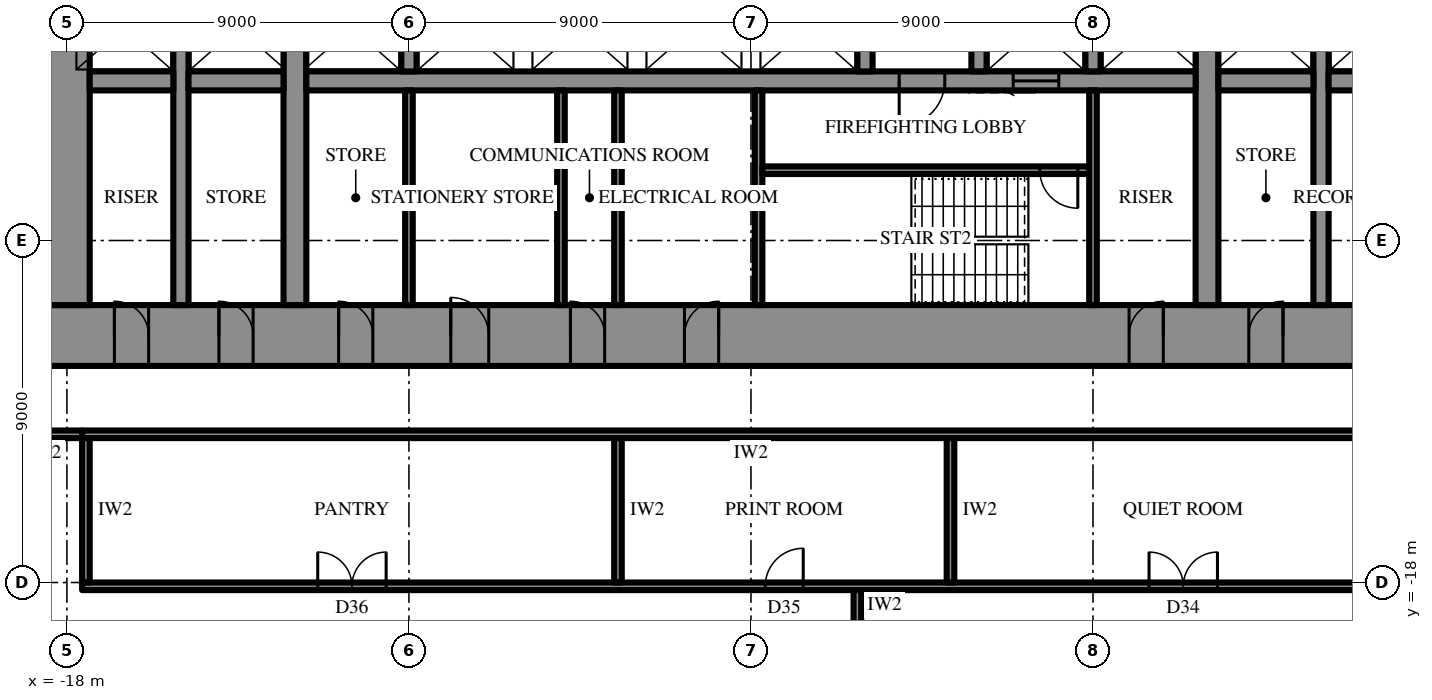
"""IFC4 building model, lengths in metres.
Left out: names, types, materials, properties, quantities, classifications, styles, units other than length and angle.
Written with IfcOpenShell. Run it as: python <this file> out.ifc"""

import sys

from ifc_helpers import new_model, si_unit, direction, frame, frame_2d, origin, place, context, subcontext, project, spatial, rectangle, extrude, element, fill, save


model = new_model("IFC4")
c1 = context("Model", 3, precision=1e-05, world=origin(), true_north=direction((0.0, 1.0)))
c2 = subcontext(c1, "Body", "Model", "MODEL_VIEW")
j1 = project(units=[si_unit("LENGTHUNIT", "METRE"), si_unit("PLANEANGLEUNIT", "RADIAN")], contexts=[c1])
p1 = place(None, origin())
s1 = spatial("IfcSite", under=j1, at=p1, CompositionType="ELEMENT")
p2 = place(p1, origin())
s2 = spatial("IfcBuilding", under=s1, at=p2, CompositionType="ELEMENT")
p3 = place(p2, frame((0.0, 0.0, 36.1)))
s3 = spatial("IfcBuildingStorey", under=s2, at=p3, CompositionType="ELEMENT", Elevation=36.1)
p4 = place(p3, frame((18.6, -11.5, 0.0), z_axis=(0.0, 0.0, 1.0), x_axis=(-1.0, 0.0, 0.0)))
e1 = element("IfcWall", 1, at=p4, inside=s3, PredefinedType="SHEAR", context=c2, shape_type="SweptSolid", body=[
    extrude(rectangle(XDim=37.2, YDim=1.6, at=frame_2d((18.6, 0.0))), origin(), (0.0, 0.0, 1.0), 4.2),
])
p5 = place(p4, frame((19.45, 0.0, 0.0)))
e2 = element("IfcOpeningElement", 2, at=p5, cuts=e1, PredefinedType="OPENING", context=c2, shape_type="SweptSolid", body=[
    extrude(rectangle(XDim=0.9, YDim=2.2, at=frame_2d((0.45, 1.1))), frame((0.0, 0.81, 0.0), z_axis=(0.0, -1.0, 0.0), x_axis=(1.0, 0.0, 0.0)), (0.0, 0.0, 1.0), 1.62),
])
p6 = place(p4, frame((22.45, 0.0, 0.0)))
e3 = element("IfcOpeningElement", 3, at=p6, cuts=e1, PredefinedType="OPENING", context=c2, shape_type="SweptSolid", body=[
    extrude(rectangle(XDim=0.9, YDim=2.2, at=frame_2d((0.45, 1.1))), frame((0.0, 0.81, 0.0), z_axis=(0.0, -1.0, 0.0), x_axis=(1.0, 0.0, 0.0)), (0.0, 0.0, 1.0), 1.62),
])
p7 = place(p4, frame((25.5, 0.0, 0.0)))
e4 = element("IfcOpeningElement", 4, at=p7, cuts=e1, PredefinedType="OPENING", context=c2, shape_type="SweptSolid", body=[
    extrude(rectangle(XDim=1.0, YDim=2.2, at=frame_2d((0.5, 1.1))), frame((0.0, 0.81, 0.0), z_axis=(0.0, -1.0, 0.0), x_axis=(1.0, 0.0, 0.0)), (0.0, 0.0, 1.0), 1.62),
])
p8 = place(p4, frame((1.85, 0.0, 0.0)))
e5 = element("IfcOpeningElement", 5, at=p8, cuts=e1, PredefinedType="OPENING", context=c2, shape_type="SweptSolid", body=[
    extrude(rectangle(XDim=0.9, YDim=2.2, at=frame_2d((0.45, 1.1))), frame((0.0, 0.81, 0.0), z_axis=(0.0, -1.0, 0.0), x_axis=(1.0, 0.0, 0.0)), (0.0, 0.0, 1.0), 1.62),
])
p9 = place(p4, frame((4.6, 0.0, 0.0)))
e6 = element("IfcOpeningElement", 6, at=p9, cuts=e1, PredefinedType="OPENING", context=c2, shape_type="SweptSolid", body=[
    extrude(rectangle(XDim=0.9, YDim=2.2, at=frame_2d((0.45, 1.1))), frame((0.0, 0.81, 0.0), z_axis=(0.0, -1.0, 0.0), x_axis=(1.0, 0.0, 0.0)), (0.0, 0.0, 1.0), 1.62),
])
p10 = place(p4, frame((7.75, 0.0, 0.0)))
e7 = element("IfcOpeningElement", 7, at=p10, cuts=e1, PredefinedType="OPENING", context=c2, shape_type="SweptSolid", body=[
    extrude(rectangle(XDim=0.9, YDim=2.2, at=frame_2d((0.45, 1.1))), frame((0.0, 0.81, 0.0), z_axis=(0.0, -1.0, 0.0), x_axis=(1.0, 0.0, 0.0)), (0.0, 0.0, 1.0), 1.62),
])
p11 = place(p4, frame((28.55, 0.0, 0.0)))
e8 = element("IfcOpeningElement", 8, at=p11, cuts=e1, PredefinedType="OPENING", context=c2, shape_type="SweptSolid", body=[
    extrude(rectangle(XDim=0.9, YDim=2.2, at=frame_2d((0.45, 1.1))), frame((0.0, 0.81, 0.0), z_axis=(0.0, -1.0, 0.0), x_axis=(1.0, 0.0, 0.0)), (0.0, 0.0, 1.0), 1.62),
])
p12 = place(p4, frame((31.7, 0.0, 0.0)))
e9 = element("IfcOpeningElement", 9, at=p12, cuts=e1, PredefinedType="OPENING", context=c2, shape_type="SweptSolid", body=[
    extrude(rectangle(XDim=0.9, YDim=2.2, at=frame_2d((0.45, 1.1))), frame((0.0, 0.81, 0.0), z_axis=(0.0, -1.0, 0.0), x_axis=(1.0, 0.0, 0.0)), (0.0, 0.0, 1.0), 1.62),
])
p13 = place(p4, frame((34.45, 0.0, 0.0)))
e10 = element("IfcOpeningElement", 10, at=p13, cuts=e1, PredefinedType="OPENING", context=c2, shape_type="SweptSolid", body=[
    extrude(rectangle(XDim=0.9, YDim=2.2, at=frame_2d((0.45, 1.1))), frame((0.0, 0.81, 0.0), z_axis=(0.0, -1.0, 0.0), x_axis=(1.0, 0.0, 0.0)), (0.0, 0.0, 1.0), 1.62),
])
p14 = place(p3, frame((-18.0, 10.7, 0.0), z_axis=(0.0, 0.0, 1.0), x_axis=(0.0, -1.0, 0.0)))
e11 = element("IfcWall", 11, at=p14, inside=s3, PredefinedType="SHEAR", context=c2, shape_type="SweptSolid", body=[
    extrude(rectangle(XDim=21.4, YDim=1.2, at=frame_2d((10.7, 0.0))), origin(), (0.0, 0.0, 1.0), 4.2),
])
p15 = place(p14, frame((9.8, 0.0, 0.0)))
e12 = element("IfcOpeningElement", 12, at=p15, cuts=e11, PredefinedType="OPENING", context=c2, shape_type="SweptSolid", body=[
    extrude(rectangle(XDim=1.8, YDim=2.4, at=frame_2d((0.9, 1.2))), frame((0.0, 0.61, 0.0), z_axis=(0.0, -1.0, 0.0), x_axis=(1.0, 0.0, 0.0)), (0.0, 0.0, 1.0), 1.22),
])
p16 = place(p3, frame((12.0, -10.7, 0.0), z_axis=(0.0, 0.0, 1.0), x_axis=(0.0, 1.0, 0.0)))
e13 = element("IfcWall", 13, at=p16, inside=s3, PredefinedType="SHEAR", context=c2, shape_type="SweptSolid", body=[
    extrude(rectangle(XDim=21.4, YDim=0.6, at=frame_2d((10.7, 0.0))), origin(), (0.0, 0.0, 1.0), 4.2),
])
p17 = place(p16, frame((9.8, 0.0, 0.0)))
e14 = element("IfcOpeningElement", 14, at=p17, cuts=e13, PredefinedType="OPENING", context=c2, shape_type="SweptSolid", body=[
    extrude(rectangle(XDim=1.8, YDim=2.4, at=frame_2d((0.9, 1.2))), frame((0.0, 0.31, 0.0), z_axis=(0.0, -1.0, 0.0), x_axis=(1.0, 0.0, 0.0)), (0.0, 0.0, 1.0), 0.62),
])
p18 = place(p3, frame((-12.0, -10.7, 0.0), z_axis=(0.0, 0.0, 1.0), x_axis=(0.0, 1.0, 0.0)))
e15 = element("IfcWall", 15, at=p18, inside=s3, PredefinedType="SHEAR", context=c2, shape_type="SweptSolid", body=[
    extrude(rectangle(XDim=21.4, YDim=0.6, at=frame_2d((10.7, 0.0))), origin(), (0.0, 0.0, 1.0), 4.2),
])
p19 = place(p18, frame((9.8, 0.0, 0.0)))
e16 = element("IfcOpeningElement", 16, at=p19, cuts=e15, PredefinedType="OPENING", context=c2, shape_type="SweptSolid", body=[
    extrude(rectangle(XDim=1.8, YDim=2.4, at=frame_2d((0.9, 1.2))), frame((0.0, 0.31, 0.0), z_axis=(0.0, -1.0, 0.0), x_axis=(1.0, 0.0, 0.0)), (0.0, 0.0, 1.0), 0.62),
])
p20 = place(p3, frame((15.0, -10.7, 0.0), z_axis=(0.0, 0.0, 1.0), x_axis=(0.0, 1.0, 0.0)))
e17 = element("IfcWall", 17, at=p20, inside=s3, PredefinedType="SHEAR", context=c2, shape_type="SweptSolid", body=[
    extrude(rectangle(XDim=21.4, YDim=0.4, at=frame_2d((10.7, 0.0))), origin(), (0.0, 0.0, 1.0), 4.2),
])
p21 = place(p20, frame((9.8, 0.0, 0.0)))
e18 = element("IfcOpeningElement", 18, at=p21, cuts=e17, PredefinedType="OPENING", context=c2, shape_type="SweptSolid", body=[
    extrude(rectangle(XDim=1.8, YDim=2.4, at=frame_2d((0.9, 1.2))), frame((0.0, 0.21, 0.0), z_axis=(0.0, -1.0, 0.0), x_axis=(1.0, 0.0, 0.0)), (0.0, 0.0, 1.0), 0.42),
])
p22 = place(p3, frame((-15.0, -10.7, 0.0), z_axis=(0.0, 0.0, 1.0), x_axis=(0.0, 1.0, 0.0)))
e19 = element("IfcWall", 19, at=p22, inside=s3, PredefinedType="SHEAR", context=c2, shape_type="SweptSolid", body=[
    extrude(rectangle(XDim=21.4, YDim=0.4, at=frame_2d((10.7, 0.0))), origin(), (0.0, 0.0, 1.0), 4.2),
])
p23 = place(p22, frame((9.8, 0.0, 0.0)))
e20 = element("IfcOpeningElement", 20, at=p23, cuts=e19, PredefinedType="OPENING", context=c2, shape_type="SweptSolid", body=[
    extrude(rectangle(XDim=1.8, YDim=2.4, at=frame_2d((0.9, 1.2))), frame((0.0, 0.21, 0.0), z_axis=(0.0, -1.0, 0.0), x_axis=(1.0, 0.0, 0.0)), (0.0, 0.0, 1.0), 0.42),
])
p24 = place(p3, frame((17.4, -4.8, 0.0), z_axis=(0.0, 0.0, 1.0), x_axis=(-1.0, 0.0, 0.0)))
e21 = element("IfcWall", 21, at=p24, inside=s3, PredefinedType="SHEAR", context=c2, shape_type="SweptSolid", body=[
    extrude(rectangle(XDim=2.2, YDim=0.5, at=frame_2d((1.1, 0.0))), origin(), (0.0, 0.0, 1.0), 4.2),
])
p25 = place(p3, frame((14.8, -4.8, 0.0), z_axis=(0.0, 0.0, 1.0), x_axis=(-1.0, 0.0, 0.0)))
e22 = element("IfcWall", 22, at=p25, inside=s3, PredefinedType="SHEAR", context=c2, shape_type="SweptSolid", body=[
    extrude(rectangle(XDim=2.5, YDim=0.5, at=frame_2d((1.25, 0.0))), origin(), (0.0, 0.0, 1.0), 4.2),
])
p26 = place(p3, frame((11.7, -4.8, 0.0), z_axis=(0.0, 0.0, 1.0), x_axis=(-1.0, 0.0, 0.0)))
e23 = element("IfcWall", 23, at=p26, inside=s3, PredefinedType="SHEAR", context=c2, shape_type="SweptSolid", body=[
    extrude(rectangle(XDim=23.4, YDim=0.5, at=frame_2d((11.7, 0.0))), origin(), (0.0, 0.0, 1.0), 4.2),
])
p27 = place(p26, frame((6.6, 0.0, 0.0)))
e24 = element("IfcOpeningElement", 24, at=p27, cuts=e23, PredefinedType="OPENING", context=c2, shape_type="SweptSolid", body=[
    extrude(rectangle(XDim=1.2, YDim=2.2, at=frame_2d((0.6, 1.1))), frame((0.0, 0.26, 0.0), z_axis=(0.0, -1.0, 0.0), x_axis=(1.0, 0.0, 0.0)), (0.0, 0.0, 1.0), 0.52),
])
p28 = place(p26, frame((3.6, 0.0, 0.0)))
e25 = element("IfcOpeningElement", 25, at=p28, cuts=e23, PredefinedType="OPENING", context=c2, shape_type="SweptSolid", body=[
    extrude(rectangle(XDim=1.2, YDim=2.2, at=frame_2d((0.6, 1.1))), frame((0.0, 0.26, 0.0), z_axis=(0.0, -1.0, 0.0), x_axis=(1.0, 0.0, 0.0)), (0.0, 0.0, 1.0), 0.52),
])
p29 = place(p3, frame((-12.3, -4.8, 0.0), z_axis=(0.0, 0.0, 1.0), x_axis=(-1.0, 0.0, 0.0)))
e26 = element("IfcWall", 26, at=p29, inside=s3, PredefinedType="SHEAR", context=c2, shape_type="SweptSolid", body=[
    extrude(rectangle(XDim=2.5, YDim=0.5, at=frame_2d((1.25, 0.0))), origin(), (0.0, 0.0, 1.0), 4.2),
])
p30 = place(p3, frame((-15.2, -4.8, 0.0), z_axis=(0.0, 0.0, 1.0), x_axis=(-1.0, 0.0, 0.0)))
e27 = element("IfcWall", 27, at=p30, inside=s3, PredefinedType="SHEAR", context=c2, shape_type="SweptSolid", body=[
    extrude(rectangle(XDim=2.2, YDim=0.5, at=frame_2d((1.1, 0.0))), origin(), (0.0, 0.0, 1.0), 4.2),
])
for number, where, z_axis, x_axis in (
    (28, (9.0, -2.25, 0.0), (0.0, 0.0, 1.0), (0.0, -1.0, 0.0)),
    (29, (6.0, -2.25, 0.0), (0.0, 0.0, 1.0), (0.0, -1.0, 0.0)),
    (30, (3.0, -2.25, 0.0), (0.0, 0.0, 1.0), (0.0, -1.0, 0.0)),
    (31, (-9.0, -2.25, 0.0), (0.0, 0.0, 1.0), (0.0, -1.0, 0.0)),
):
    element("IfcWall", number, at=place(p3, frame(where, z_axis=z_axis, x_axis=x_axis)), inside=s3, PredefinedType="SHEAR", context=c2, shape_type="SweptSolid", body=[
        extrude(rectangle(XDim=2.3, YDim=0.4, at=frame_2d((1.15, 0.0))), origin(), (0.0, 0.0, 1.0), 4.2),
    ])
p31 = place(p3, frame((0.2, -5.05, 0.0), z_axis=(0.0, 0.0, 1.0), x_axis=(0.0, -1.0, 0.0)))
e32 = element("IfcWall", 32, at=p31, inside=s3, PredefinedType="SHEAR", context=c2, shape_type="SweptSolid", body=[
    extrude(rectangle(XDim=5.65, YDim=0.2, at=frame_2d((2.825, 0.0))), origin(), (0.0, 0.0, 1.0), 4.2),
])
p32 = place(p3, frame((8.9, -7.15, 0.0), z_axis=(0.0, 0.0, 1.0), x_axis=(-1.0, 0.0, 0.0)))
e33 = element("IfcWall", 33, at=p32, inside=s3, PredefinedType="SHEAR", context=c2, shape_type="SweptSolid", body=[
    extrude(rectangle(XDim=8.6, YDim=0.2, at=frame_2d((4.3, 0.0))), origin(), (0.0, 0.0, 1.0), 4.2),
])
p33 = place(p32, frame((0.3, 0.0, 0.0)))
e34 = element("IfcOpeningElement", 34, at=p33, cuts=e33, PredefinedType="OPENING", context=c2, shape_type="SweptSolid", body=[
    extrude(rectangle(XDim=1.0, YDim=2.2, at=frame_2d((0.5, 1.1))), frame((0.0, 0.11, 0.0), z_axis=(0.0, -1.0, 0.0), x_axis=(1.0, 0.0, 0.0)), (0.0, 0.0, 1.0), 0.22),
])
for number, where, z_axis, x_axis in (
    (35, (9.0, -5.05, 0.0), (0.0, 0.0, 1.0), (0.0, -1.0, 0.0)),
    (36, (-9.0, -5.05, 0.0), (0.0, 0.0, 1.0), (0.0, -1.0, 0.0)),
    (37, (-3.5, -5.05, 0.0), (0.0, 0.0, 1.0), (0.0, -1.0, 0.0)),
    (38, (-5.0, -5.05, 0.0), (0.0, 0.0, 1.0), (0.0, -1.0, 0.0)),
):
    element("IfcWall", number, at=place(p3, frame(where, z_axis=z_axis, x_axis=x_axis)), inside=s3, PredefinedType="PARTITIONING", context=c2, shape_type="SweptSolid", body=[
        extrude(rectangle(XDim=5.65, YDim=0.2, at=frame_2d((2.825, 0.0))), origin(), (0.0, 0.0, 1.0), 4.0),
    ])
p34 = place(p3, frame((17.6, -14.1, 0.0), z_axis=(0.0, 0.0, 1.0), x_axis=(-1.0, 0.0, 0.0)))
e39 = element("IfcWall", 39, at=p34, inside=s3, PredefinedType="PARTITIONING", context=c2, shape_type="SweptSolid", body=[
    extrude(rectangle(XDim=35.2, YDim=0.2, at=frame_2d((17.6, 0.0))), origin(), (0.0, 0.0, 1.0), 4.0),
])
p35 = place(p3, frame((17.6, -18.1, 0.0), z_axis=(0.0, 0.0, 1.0), x_axis=(-1.0, 0.0, 0.0)))
e40 = element("IfcWall", 40, at=p35, inside=s3, PredefinedType="PARTITIONING", context=c2, shape_type="SweptSolid", body=[
    extrude(rectangle(XDim=35.2, YDim=0.2, at=frame_2d((17.6, 0.0))), origin(), (0.0, 0.0, 1.0), 4.0),
])
p36 = place(p35, frame((5.325, 0.0, 0.0)))
e41 = element("IfcOpeningElement", 41, at=p36, cuts=e40, PredefinedType="OPENING", context=c2, shape_type="SweptSolid", body=[
    extrude(rectangle(XDim=1.8, YDim=2.4, at=frame_2d((0.9, 1.2))), frame((0.0, 0.11, 0.0), z_axis=(0.0, -1.0, 0.0), x_axis=(1.0, 0.0, 0.0)), (0.0, 0.0, 1.0), 0.22),
])
p37 = place(p35, frame((16.225, 0.0, 0.0)))
e42 = element("IfcOpeningElement", 42, at=p37, cuts=e40, PredefinedType="OPENING", context=c2, shape_type="SweptSolid", body=[
    extrude(rectangle(XDim=1.0, YDim=2.2, at=frame_2d((0.5, 1.1))), frame((0.0, 0.11, 0.0), z_axis=(0.0, -1.0, 0.0), x_axis=(1.0, 0.0, 0.0)), (0.0, 0.0, 1.0), 0.22),
])
p38 = place(p35, frame((27.2, 0.0, 0.0)))
e43 = element("IfcOpeningElement", 43, at=p38, cuts=e40, PredefinedType="OPENING", context=c2, shape_type="SweptSolid", body=[
    extrude(rectangle(XDim=1.8, YDim=2.4, at=frame_2d((0.9, 1.2))), frame((0.0, 0.11, 0.0), z_axis=(0.0, -1.0, 0.0), x_axis=(1.0, 0.0, 0.0)), (0.0, 0.0, 1.0), 0.22),
])
p39 = place(p3, frame((5.25, -14.2, 0.0), z_axis=(0.0, 0.0, 1.0), x_axis=(0.0, -1.0, 0.0)))
e44 = element("IfcWall", 44, at=p39, inside=s3, PredefinedType="PARTITIONING", context=c2, shape_type="SweptSolid", body=[
    extrude(rectangle(XDim=3.8, YDim=0.2, at=frame_2d((1.9, 0.0))), origin(), (0.0, 0.0, 1.0), 2.944),
])
for number, where, z_axis, x_axis in (
    (45, (-3.5, -14.2, 0.0), (0.0, 0.0, 1.0), (0.0, -1.0, 0.0)),
    (46, (-17.5, -14.2, 0.0), (0.0, 0.0, 1.0), (0.0, -1.0, 0.0)),
):
    element("IfcWall", number, at=place(p3, frame(where, z_axis=z_axis, x_axis=x_axis)), inside=s3, PredefinedType="PARTITIONING", context=c2, shape_type="SweptSolid", body=[
        extrude(rectangle(XDim=3.8, YDim=0.2, at=frame_2d((1.9, 0.0))), origin(), (0.0, 0.0, 1.0), 4.0),
    ])
p40 = place(p3, frame((-17.6, -14.1, 0.0), z_axis=(0.0, 0.0, 1.0), x_axis=(-1.0, 0.0, 0.0)))
e47 = element("IfcWall", 47, at=p40, inside=s3, PredefinedType="PARTITIONING", context=c2, shape_type="SweptSolid", body=[
    extrude(rectangle(XDim=2.0, YDim=0.2, at=frame_2d((1.0, 0.0))), origin(), (0.0, 0.0, 1.0), 4.0),
])
p41 = place(p3, frame((2.8, -18.2, 0.0), z_axis=(0.0, 0.0, 1.0), x_axis=(0.0, -1.0, 0.0)))
e48 = element("IfcWall", 48, at=p41, inside=s3, PredefinedType="PARTITIONING", context=c2, shape_type="SweptSolid", body=[
    extrude(rectangle(XDim=15.6, YDim=0.2, at=frame_2d((7.8, 0.0))), origin(), (0.0, 0.0, 1.0), 2.944),
])
p42 = place(p27, origin())
e49 = element("IfcDoor", 49, at=p42, inside=s3, OperationType="SINGLE_SWING_LEFT", PredefinedType="DOOR", context=c2, shape_type="SweptSolid", body=[
    extrude(rectangle(XDim=1.2, YDim=2.2, at=frame_2d((0.6, 1.1))), frame((0.0, 0.025, 0.0), z_axis=(0.0, -1.0, 0.0), x_axis=(1.0, 0.0, 0.0)), (0.0, 0.0, 1.0), 0.05),
])
fill(e24, e49)
p43 = place(p33, origin())
e50 = element("IfcDoor", 50, at=p43, inside=s3, OperationType="SINGLE_SWING_RIGHT", PredefinedType="DOOR", context=c2, shape_type="SweptSolid", body=[
    extrude(rectangle(XDim=1.0, YDim=2.2, at=frame_2d((0.5, 1.1))), frame((0.0, 0.025, 0.0), z_axis=(0.0, -1.0, 0.0), x_axis=(1.0, 0.0, 0.0)), (0.0, 0.0, 1.0), 0.05),
])
fill(e34, e50)
p44 = place(p5, frame((0.9, 0.0, 0.0), z_axis=(0.0, 0.0, 1.0), x_axis=(-1.0, 0.0, 0.0)))
e51 = element("IfcDoor", 51, at=p44, inside=s3, OperationType="SINGLE_SWING_LEFT", PredefinedType="DOOR", context=c2, shape_type="SweptSolid", body=[
    extrude(rectangle(XDim=0.9, YDim=2.2, at=frame_2d((0.45, 1.1))), frame((0.0, 0.025, 0.0), z_axis=(0.0, -1.0, 0.0), x_axis=(1.0, 0.0, 0.0)), (0.0, 0.0, 1.0), 0.05),
])
fill(e2, e51)
p45 = place(p6, frame((0.9, 0.0, 0.0), z_axis=(0.0, 0.0, 1.0), x_axis=(-1.0, 0.0, 0.0)))
e52 = element("IfcDoor", 52, at=p45, inside=s3, OperationType="SINGLE_SWING_RIGHT", PredefinedType="DOOR", context=c2, shape_type="SweptSolid", body=[
    extrude(rectangle(XDim=0.9, YDim=2.2, at=frame_2d((0.45, 1.1))), frame((0.0, 0.025, 0.0), z_axis=(0.0, -1.0, 0.0), x_axis=(1.0, 0.0, 0.0)), (0.0, 0.0, 1.0), 0.05),
])
fill(e3, e52)
p46 = place(p7, frame((1.0, 0.0, 0.0), z_axis=(0.0, 0.0, 1.0), x_axis=(-1.0, 0.0, 0.0)))
e53 = element("IfcDoor", 53, at=p46, inside=s3, OperationType="SINGLE_SWING_RIGHT", PredefinedType="DOOR", context=c2, shape_type="SweptSolid", body=[
    extrude(rectangle(XDim=1.0, YDim=2.2, at=frame_2d((0.5, 1.1))), frame((0.0, 0.025, 0.0), z_axis=(0.0, -1.0, 0.0), x_axis=(1.0, 0.0, 0.0)), (0.0, 0.0, 1.0), 0.05),
])
fill(e4, e53)
p47 = place(p9, frame((0.9, 0.0, 0.0), z_axis=(0.0, 0.0, 1.0), x_axis=(-1.0, 0.0, 0.0)))
e54 = element("IfcDoor", 54, at=p47, inside=s3, OperationType="SINGLE_SWING_LEFT", PredefinedType="DOOR", context=c2, shape_type="SweptSolid", body=[
    extrude(rectangle(XDim=0.9, YDim=2.2, at=frame_2d((0.45, 1.1))), frame((0.0, 0.025, 0.0), z_axis=(0.0, -1.0, 0.0), x_axis=(1.0, 0.0, 0.0)), (0.0, 0.0, 1.0), 0.05),
])
fill(e6, e54)
p48 = place(p10, frame((0.9, 0.0, 0.0), z_axis=(0.0, 0.0, 1.0), x_axis=(-1.0, 0.0, 0.0)))
e55 = element("IfcDoor", 55, at=p48, inside=s3, OperationType="SINGLE_SWING_LEFT", PredefinedType="DOOR", context=c2, shape_type="SweptSolid", body=[
    extrude(rectangle(XDim=0.9, YDim=2.2, at=frame_2d((0.45, 1.1))), frame((0.0, 0.025, 0.0), z_axis=(0.0, -1.0, 0.0), x_axis=(1.0, 0.0, 0.0)), (0.0, 0.0, 1.0), 0.05),
])
fill(e7, e55)
p49 = place(p11, frame((0.9, 0.0, 0.0), z_axis=(0.0, 0.0, 1.0), x_axis=(-1.0, 0.0, 0.0)))
e56 = element("IfcDoor", 56, at=p49, inside=s3, OperationType="SINGLE_SWING_RIGHT", PredefinedType="DOOR", context=c2, shape_type="SweptSolid", body=[
    extrude(rectangle(XDim=0.9, YDim=2.2, at=frame_2d((0.45, 1.1))), frame((0.0, 0.025, 0.0), z_axis=(0.0, -1.0, 0.0), x_axis=(1.0, 0.0, 0.0)), (0.0, 0.0, 1.0), 0.05),
])
fill(e8, e56)
p50 = place(p12, frame((0.9, 0.0, 0.0), z_axis=(0.0, 0.0, 1.0), x_axis=(-1.0, 0.0, 0.0)))
e57 = element("IfcDoor", 57, at=p50, inside=s3, OperationType="SINGLE_SWING_RIGHT", PredefinedType="DOOR", context=c2, shape_type="SweptSolid", body=[
    extrude(rectangle(XDim=0.9, YDim=2.2, at=frame_2d((0.45, 1.1))), frame((0.0, 0.025, 0.0), z_axis=(0.0, -1.0, 0.0), x_axis=(1.0, 0.0, 0.0)), (0.0, 0.0, 1.0), 0.05),
])
fill(e9, e57)
p51 = place(p13, frame((0.9, 0.0, 0.0), z_axis=(0.0, 0.0, 1.0), x_axis=(-1.0, 0.0, 0.0)))
e58 = element("IfcDoor", 58, at=p51, inside=s3, OperationType="SINGLE_SWING_RIGHT", PredefinedType="DOOR", context=c2, shape_type="SweptSolid", body=[
    extrude(rectangle(XDim=0.9, YDim=2.2, at=frame_2d((0.45, 1.1))), frame((0.0, 0.025, 0.0), z_axis=(0.0, -1.0, 0.0), x_axis=(1.0, 0.0, 0.0)), (0.0, 0.0, 1.0), 0.05),
])
fill(e10, e58)
p52 = place(p28, origin())
e59 = element("IfcDoor", 59, at=p52, inside=s3, OperationType="SLIDING_TO_LEFT", PredefinedType="DOOR", context=c2, shape_type="SweptSolid", body=[
    extrude(rectangle(XDim=1.2, YDim=2.2, at=frame_2d((0.6, 1.1))), frame((0.0, 0.025, 0.0), z_axis=(0.0, -1.0, 0.0), x_axis=(1.0, 0.0, 0.0)), (0.0, 0.0, 1.0), 0.05),
])
fill(e25, e59)
p53 = place(p36, frame((1.8, 0.0, 0.0), z_axis=(0.0, 0.0, 1.0), x_axis=(-1.0, 0.0, 0.0)))
e60 = element("IfcDoor", 60, at=p53, inside=s3, OperationType="DOUBLE_DOOR_SINGLE_SWING", PredefinedType="DOOR", context=c2, shape_type="SweptSolid", body=[
    extrude(rectangle(XDim=1.8, YDim=2.4, at=frame_2d((0.9, 1.2))), frame((0.0, 0.025, 0.0), z_axis=(0.0, -1.0, 0.0), x_axis=(1.0, 0.0, 0.0)), (0.0, 0.0, 1.0), 0.05),
])
fill(e41, e60)
p54 = place(p37, frame((1.0, 0.0, 0.0), z_axis=(0.0, 0.0, 1.0), x_axis=(-1.0, 0.0, 0.0)))
e61 = element("IfcDoor", 61, at=p54, inside=s3, OperationType="SINGLE_SWING_LEFT", PredefinedType="DOOR", context=c2, shape_type="SweptSolid", body=[
    extrude(rectangle(XDim=1.0, YDim=2.2, at=frame_2d((0.5, 1.1))), frame((0.0, 0.025, 0.0), z_axis=(0.0, -1.0, 0.0), x_axis=(1.0, 0.0, 0.0)), (0.0, 0.0, 1.0), 0.05),
])
fill(e42, e61)
p55 = place(p38, frame((1.8, 0.0, 0.0), z_axis=(0.0, 0.0, 1.0), x_axis=(-1.0, 0.0, 0.0)))
e62 = element("IfcDoor", 62, at=p55, inside=s3, OperationType="DOUBLE_DOOR_SINGLE_SWING", PredefinedType="DOOR", context=c2, shape_type="SweptSolid", body=[
    extrude(rectangle(XDim=1.8, YDim=2.4, at=frame_2d((0.9, 1.2))), frame((0.0, 0.025, 0.0), z_axis=(0.0, -1.0, 0.0), x_axis=(1.0, 0.0, 0.0)), (0.0, 0.0, 1.0), 0.05),
])
fill(e43, e62)
save(model, sys.argv[1])
